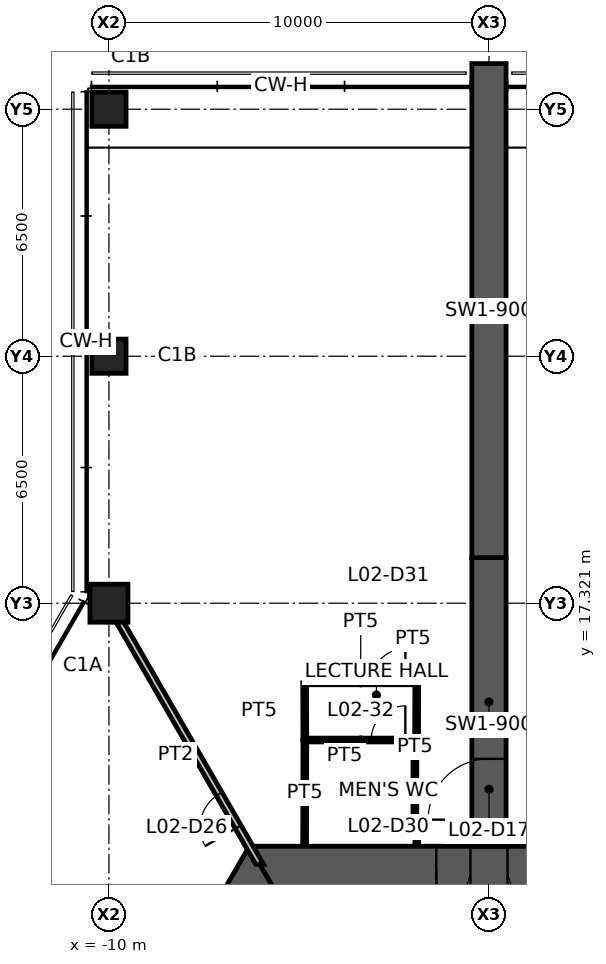
"""IFC4 building model, lengths in metres.
Left out: names, types, materials, properties, quantities, classifications, styles, units other than length and angle.
Written with IfcOpenShell. Run it as: python <this file> out.ifc"""

import sys

from ifc_helpers import new_model, si_unit, direction, frame, frame_2d, origin, origin_2d, place, context, subcontext, project, spatial, polyline, rectangle, hollow_rectangle, outline, extrude, element, fill, save


model = new_model("IFC4")
c1 = context("Model", 3, precision=1e-05, world=origin(), true_north=direction((0.0, 1.0)))
c2 = subcontext(c1, "Body", "Model", "MODEL_VIEW")
j1 = project(units=[si_unit("LENGTHUNIT", "METRE"), si_unit("PLANEANGLEUNIT", "RADIAN")], contexts=[c1])
p1 = place(None, origin())
s1 = spatial("IfcSite", under=j1, at=p1, CompositionType="ELEMENT")
p2 = place(p1, origin())
s2 = spatial("IfcBuilding", under=s1, at=p2, CompositionType="ELEMENT")
p3 = place(p2, frame((0.0, 0.0, 5.5)))
s3 = spatial("IfcBuildingStorey", under=s2, at=p3, CompositionType="ELEMENT", Elevation=5.5)
p4 = place(p3, frame((-10.0, 17.321, 0.0), z_axis=(0.0, 0.0, 1.0), x_axis=(1.0, 0.0, 0.0)))
e1 = element("IfcColumn", 1, at=p4, inside=s3, PredefinedType="COLUMN", context=c2, shape_type="SweptSolid", body=[
    extrude(hollow_rectangle(XDim=1.0, YDim=1.0, WallThickness=0.06, at=origin_2d()), origin(), (0.0, 0.0, 1.0), 4.5),
])
for number, where, z_axis, x_axis in (
    (2, (-10.0, 23.821, 0.0), (0.0, 0.0, 1.0), (1.0, 0.0, 0.0)),
    (3, (-10.0, 30.321, 0.0), (0.0, 0.0, 1.0), (1.0, 0.0, 0.0)),
):
    element("IfcColumn", number, at=place(p3, frame(where, z_axis=z_axis, x_axis=x_axis)), inside=s3, PredefinedType="COLUMN", context=c2, shape_type="SweptSolid", body=[
        extrude(hollow_rectangle(XDim=0.9, YDim=0.9, WallThickness=0.05, at=origin_2d()), origin(), (0.0, 0.0, 1.0), 4.5),
    ])
p5 = place(p3, frame((5.961, 10.325, 0.0), z_axis=(0.0, 0.0, 1.0), x_axis=(-1.0, 0.0, 0.0)))
e4 = element("IfcWall", 4, at=p5, inside=s3, PredefinedType="SHEAR", context=c2, shape_type="SweptSolid", body=[
    extrude(outline(polyline([(-0.346, -0.6), (4.574, -0.6), (5.474, -0.6), (6.449, -0.6), (7.349, -0.6), (12.269, -0.6), (11.576, 0.6), (7.349, 0.6), (6.449, 0.6), (5.474, 0.6), (4.574, 0.6), (0.346, 0.6), (-0.346, -0.6)])), origin(), (0.0, 0.0, 1.0), 4.5),
])
p6 = place(p5, frame((6.449, 0.0, 0.0)))
e5 = element("IfcOpeningElement", 5, at=p6, cuts=e4, PredefinedType="OPENING", context=c2, shape_type="SweptSolid", body=[
    extrude(rectangle(XDim=0.9, YDim=2.1, at=frame_2d((0.45, 1.05))), frame((0.0, 0.61, 0.0), z_axis=(0.0, -1.0, 0.0), x_axis=(1.0, 0.0, 0.0)), (0.0, 0.0, 1.0), 1.22),
])
p7 = place(p5, frame((4.574, 0.0, 0.0)))
e6 = element("IfcOpeningElement", 6, at=p7, cuts=e4, PredefinedType="OPENING", context=c2, shape_type="SweptSolid", body=[
    extrude(rectangle(XDim=0.9, YDim=2.1, at=frame_2d((0.45, 1.05))), frame((0.0, 0.61, 0.0), z_axis=(0.0, -1.0, 0.0), x_axis=(1.0, 0.0, 0.0)), (0.0, 0.0, 1.0), 1.22),
])
p8 = place(p3, frame((-5.961, 10.325, 0.0), z_axis=(0.0, 0.0, 1.0), x_axis=(-0.500004296715, -0.866022923061, 0.0)))
e7 = element("IfcWall", 7, at=p8, inside=s3, PredefinedType="SHEAR", context=c2, shape_type="SweptSolid", body=[
    extrude(outline(polyline([(-0.346, -0.6), (4.494, -0.6), (5.494, -0.6), (12.269, -0.6), (11.576, 0.6), (5.494, 0.6), (4.494, 0.6), (0.346, 0.6), (-0.346, -0.6)])), origin(), (0.0, 0.0, 1.0), 4.5),
])
p9 = place(p8, frame((4.494, 0.0, 0.0)))
e8 = element("IfcOpeningElement", 8, at=p9, cuts=e7, PredefinedType="OPENING", context=c2, shape_type="SweptSolid", body=[
    extrude(rectangle(XDim=1.0, YDim=2.1, at=frame_2d((0.5, 1.05))), frame((0.0, 0.61, 0.0), z_axis=(0.0, -1.0, 0.0), x_axis=(1.0, 0.0, 0.0)), (0.0, 0.0, 1.0), 1.22),
])
p10 = place(p3, frame((0.0, 10.925, 0.0), z_axis=(0.0, 0.0, 1.0), x_axis=(0.0, 1.0, 0.0)))
e9 = element("IfcWall", 9, at=p10, inside=s3, PredefinedType="SHEAR", context=c2, shape_type="SweptSolid", body=[
    extrude(rectangle(XDim=7.595, YDim=0.9, at=frame_2d((3.798, 0.0))), origin(), (0.0, 0.0, 1.0), 4.5),
])
p11 = place(p10, frame((0.7, 0.0, 0.0)))
e10 = element("IfcOpeningElement", 10, at=p11, cuts=e9, PredefinedType="OPENING", context=c2, shape_type="SweptSolid", body=[
    extrude(rectangle(XDim=1.6, YDim=2.1, at=frame_2d((0.8, 1.05))), frame((0.0, 0.46, 0.0), z_axis=(0.0, -1.0, 0.0), x_axis=(1.0, 0.0, 0.0)), (0.0, 0.0, 1.0), 0.92),
])
p12 = place(p3, frame((0.0, 18.521, 0.0), z_axis=(0.0, 0.0, 1.0), x_axis=(0.0, 1.0, 0.0)))
e11 = element("IfcWall", 11, at=p12, inside=s3, PredefinedType="SHEAR", context=c2, shape_type="SweptSolid", body=[
    extrude(rectangle(XDim=13.0, YDim=0.9, at=frame_2d((6.5, 0.0))), origin(), (0.0, 0.0, 1.0), 4.5),
])
p13 = place(p3, frame((-6.035, 10.453, 0.0), z_axis=(0.0, 0.0, 1.0), x_axis=(-0.499993402427, 0.866029212861, 0.0)))
e12 = element("IfcWall", 12, at=p13, inside=s3, PredefinedType="PARTITIONING", context=c2, shape_type="SweptSolid", body=[
    extrude(outline(polyline([(-0.051, -0.087), (1.129, -0.087), (2.129, -0.087), (7.93, -0.087), (7.93, 0.087), (2.129, 0.087), (1.129, 0.087), (0.051, 0.087), (-0.051, -0.087)])), origin(), (0.0, 0.0, 1.0), 3.6),
])
p14 = place(p13, frame((1.129, 0.0, 0.0)))
e13 = element("IfcOpeningElement", 13, at=p14, cuts=e12, PredefinedType="OPENING", context=c2, shape_type="SweptSolid", body=[
    extrude(rectangle(XDim=1.0, YDim=2.1, at=frame_2d((0.5, 1.05))), frame((0.0, 0.098, 0.0), z_axis=(0.0, -1.0, 0.0), x_axis=(1.0, 0.0, 0.0)), (0.0, 0.0, 1.0), 0.195),
])
p15 = place(p3, frame((-4.85, 13.72, 0.0), z_axis=(0.0, 0.0, 1.0), x_axis=(1.0, 0.0, 0.0)))
e14 = element("IfcWall", 14, at=p15, inside=s3, PredefinedType="PARTITIONING", context=c2, shape_type="SweptSolid", body=[
    extrude(rectangle(XDim=2.95, YDim=0.1, at=frame_2d((1.475, 0.0))), origin(), (0.0, 0.0, 1.0), 3.5),
])
p16 = place(p15, frame((1.75, 0.0, 0.0)))
e15 = element("IfcOpeningElement", 15, at=p16, cuts=e14, PredefinedType="OPENING", context=c2, shape_type="SweptSolid", body=[
    extrude(rectangle(XDim=0.9, YDim=2.1, at=frame_2d((0.45, 1.05))), frame((0.0, 0.06, 0.0), z_axis=(0.0, -1.0, 0.0), x_axis=(1.0, 0.0, 0.0)), (0.0, 0.0, 1.0), 0.12),
])
p17 = place(p3, frame((-4.85, 10.945, 0.0), z_axis=(0.0, 0.0, 1.0), x_axis=(0.001756386155, 0.999998457553, 0.0)))
e16 = element("IfcWall", 16, at=p17, inside=s3, PredefinedType="PARTITIONING", context=c2, shape_type="SweptSolid", body=[
    extrude(rectangle(XDim=2.78, YDim=0.1, at=frame_2d((1.39, 0.0))), origin(), (0.0, 0.0, 1.0), 3.5),
])
p18 = place(p3, frame((-1.95, 13.525, 0.0), z_axis=(0.0, 0.0, 1.0), x_axis=(0.0, -1.0, 0.0)))
e17 = element("IfcWall", 17, at=p18, inside=s3, PredefinedType="PARTITIONING", context=c2, shape_type="SweptSolid", body=[
    extrude(rectangle(XDim=2.2, YDim=0.1, at=frame_2d((1.1, 0.0))), origin(), (0.0, 0.0, 1.0), 3.5),
])
p19 = place(p3, frame((-1.9, 11.325, 0.0), z_axis=(0.0, 0.0, 1.0), x_axis=(0.0, -1.0, 0.0)))
e18 = element("IfcWall", 18, at=p19, inside=s3, PredefinedType="PARTITIONING", context=c2, shape_type="SweptSolid", body=[
    extrude(rectangle(XDim=0.38, YDim=0.1, at=frame_2d((0.19, 0.0))), origin(), (0.0, 0.0, 1.0), 3.5),
])
p20 = place(p3, frame((-4.85, 15.225, 0.0), z_axis=(0.0, 0.0, 1.0), x_axis=(1.0, 0.0, 0.0)))
e19 = element("IfcWall", 19, at=p20, inside=s3, PredefinedType="PARTITIONING", context=c2, shape_type="SweptSolid", body=[
    extrude(rectangle(XDim=2.95, YDim=0.1, at=frame_2d((1.475, 0.0))), origin(), (0.0, 0.0, 1.0), 3.5),
])
p21 = place(p20, frame((1.75, 0.0, 0.0)))
e20 = element("IfcOpeningElement", 20, at=p21, cuts=e19, PredefinedType="OPENING", context=c2, shape_type="SweptSolid", body=[
    extrude(rectangle(XDim=0.9, YDim=2.1, at=frame_2d((0.45, 1.05))), frame((0.0, 0.06, 0.0), z_axis=(0.0, -1.0, 0.0), x_axis=(1.0, 0.0, 0.0)), (0.0, 0.0, 1.0), 0.12),
])
for number, where, z_axis, x_axis in (
    (21, (-4.845, 13.725, 0.0), (0.0, 0.0, 1.0), (-0.003, 1.0, 0.0)),
    (22, (-1.9, 15.225, 0.0), (0.0, 0.0, 1.0), (-0.003, -1.0, 0.0)),
):
    element("IfcWall", number, at=place(p3, frame(where, z_axis=z_axis, x_axis=x_axis)), inside=s3, PredefinedType="PARTITIONING", context=c2, shape_type="SweptSolid", body=[
        extrude(rectangle(XDim=1.5, YDim=0.1, at=frame_2d((0.75, 0.0))), origin(), (0.0, 0.0, 1.0), 3.5),
    ])
p22 = place(p6, origin())
e23 = element("IfcDoor", 23, at=p22, inside=s3, OperationType="SINGLE_SWING_RIGHT", PredefinedType="DOOR", context=c2, shape_type="SweptSolid", body=[
    extrude(rectangle(XDim=0.9, YDim=2.1, at=frame_2d((0.45, 1.05))), frame((0.0, 0.025, 0.0), z_axis=(0.0, -1.0, 0.0), x_axis=(1.0, 0.0, 0.0)), (0.0, 0.0, 1.0), 0.05),
])
fill(e5, e23)
p23 = place(p7, origin())
e24 = element("IfcDoor", 24, at=p23, inside=s3, OperationType="SINGLE_SWING_LEFT", PredefinedType="DOOR", context=c2, shape_type="SweptSolid", body=[
    extrude(rectangle(XDim=0.9, YDim=2.1, at=frame_2d((0.45, 1.05))), frame((0.0, 0.025, 0.0), z_axis=(0.0, -1.0, 0.0), x_axis=(1.0, 0.0, 0.0)), (0.0, 0.0, 1.0), 0.05),
])
fill(e6, e24)
p24 = place(p11, origin())
e25 = element("IfcDoor", 25, at=p24, inside=s3, OperationType="DOUBLE_DOOR_SINGLE_SWING", PredefinedType="DOOR", context=c2, shape_type="SweptSolid", body=[
    extrude(rectangle(XDim=1.6, YDim=2.1, at=frame_2d((0.8, 1.05))), frame((0.0, 0.025, 0.0), z_axis=(0.0, -1.0, 0.0), x_axis=(1.0, 0.0, 0.0)), (0.0, 0.0, 1.0), 0.05),
])
fill(e10, e25)
p25 = place(p14, origin())
e26 = element("IfcDoor", 26, at=p25, inside=s3, OperationType="SINGLE_SWING_LEFT", PredefinedType="DOOR", context=c2, shape_type="SweptSolid", body=[
    extrude(rectangle(XDim=1.0, YDim=2.1, at=frame_2d((0.5, 1.05))), frame((0.0, 0.025, 0.0), z_axis=(0.0, -1.0, 0.0), x_axis=(1.0, 0.0, 0.0)), (0.0, 0.0, 1.0), 0.05),
])
fill(e13, e26)
p26 = place(p16, origin())
e27 = element("IfcDoor", 27, at=p26, inside=s3, OperationType="SINGLE_SWING_RIGHT", PredefinedType="DOOR", context=c2, shape_type="SweptSolid", body=[
    extrude(rectangle(XDim=0.9, YDim=2.1, at=frame_2d((0.45, 1.05))), frame((0.0, 0.025, 0.0), z_axis=(0.0, -1.0, 0.0), x_axis=(1.0, 0.0, 0.0)), (0.0, 0.0, 1.0), 0.05),
])
fill(e15, e27)
p27 = place(p21, origin())
e28 = element("IfcDoor", 28, at=p27, inside=s3, OperationType="SINGLE_SWING_RIGHT", PredefinedType="DOOR", context=c2, shape_type="SweptSolid", body=[
    extrude(rectangle(XDim=0.9, YDim=2.1, at=frame_2d((0.45, 1.05))), frame((0.0, 0.025, 0.0), z_axis=(0.0, -1.0, 0.0), x_axis=(1.0, 0.0, 0.0)), (0.0, 0.0, 1.0), 0.05),
])
fill(e20, e28)
save(model, sys.argv[1])
